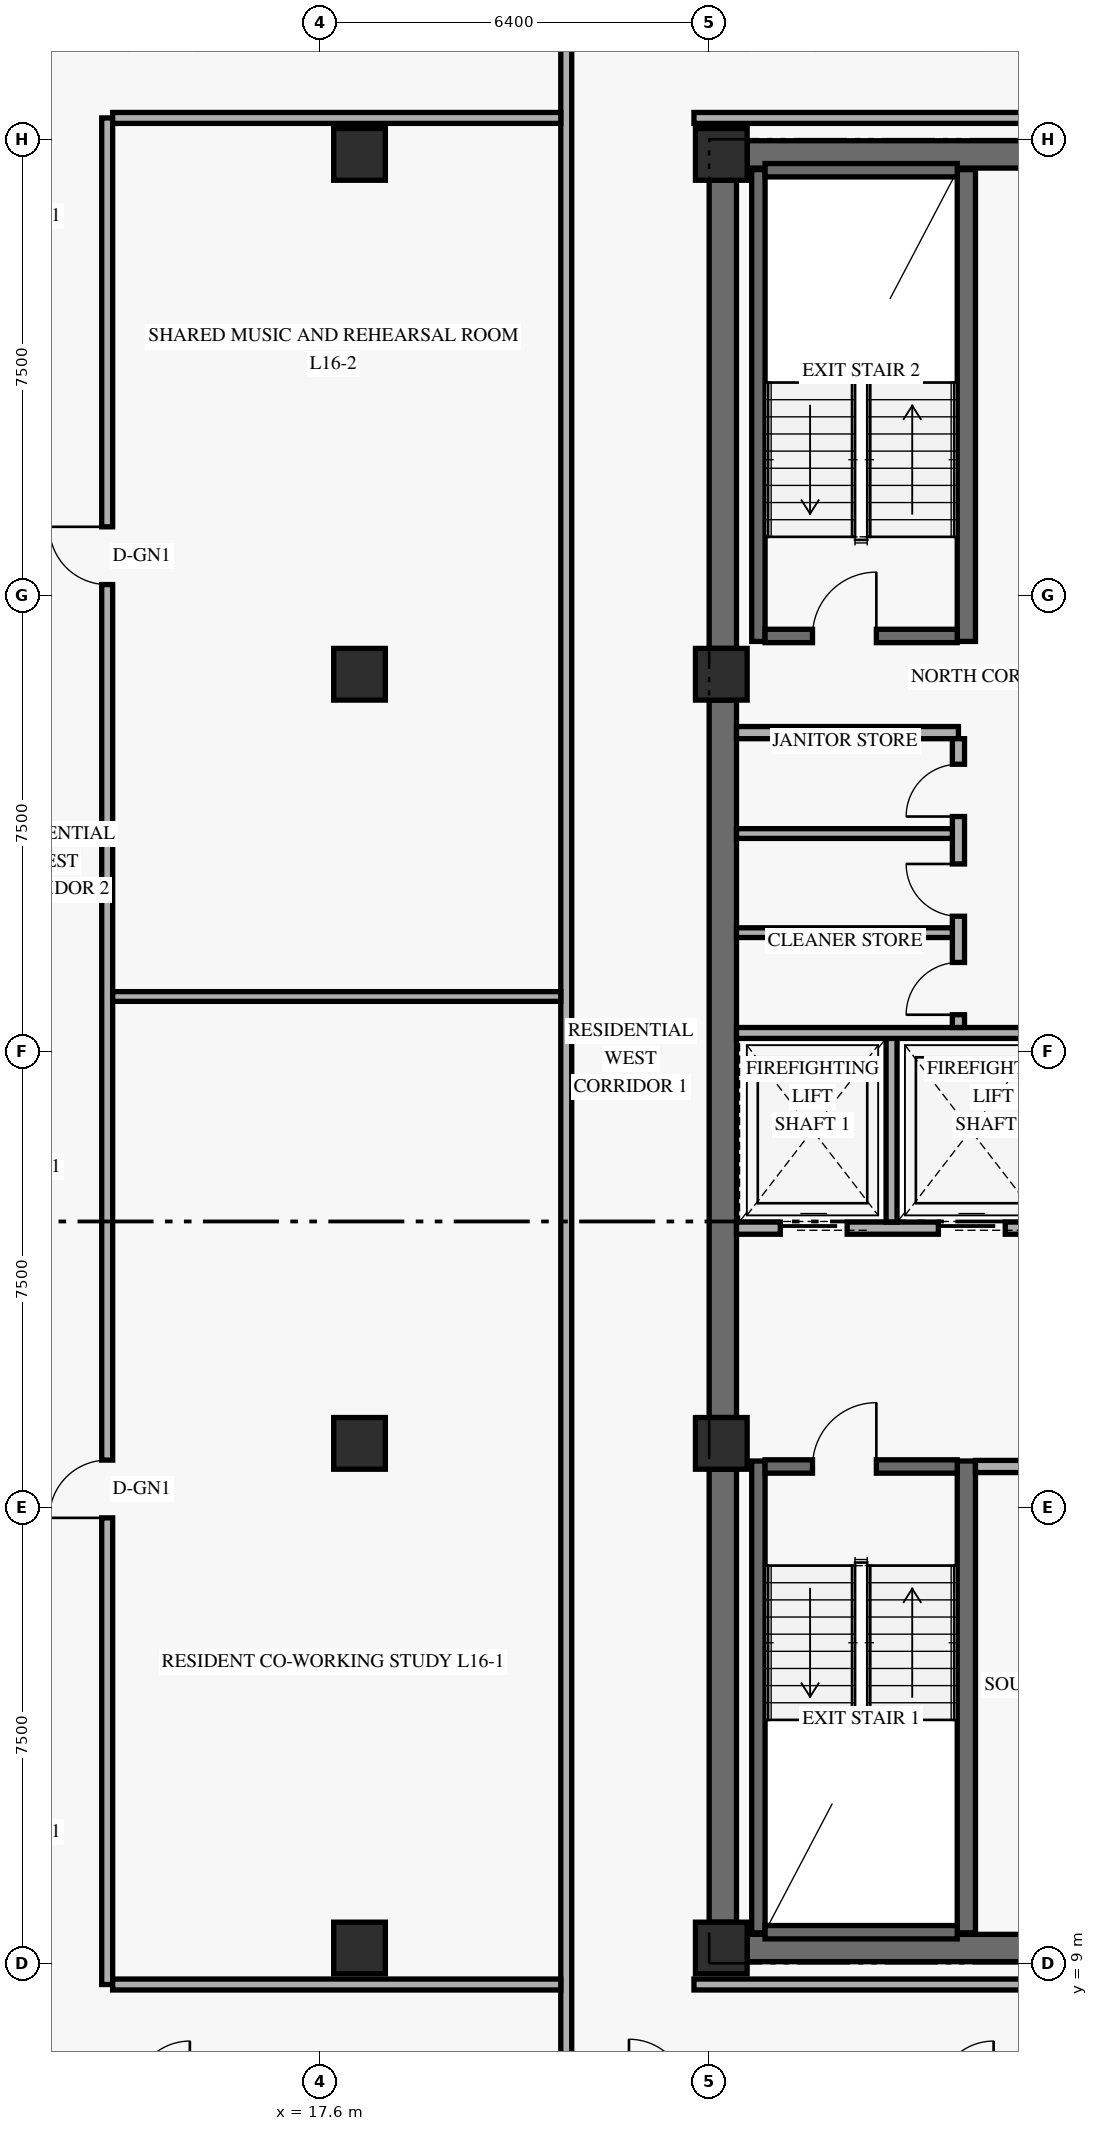
"""IFC4 building model, lengths in metres.
Left out: names, types, materials, properties, quantities, classifications, styles, units other than length and angle.
Written with IfcOpenShell. Run it as: python <this file> out.ifc"""

import sys

from ifc_helpers import new_model, si_unit, direction, frame, frame_2d, origin, origin_2d, place, context, subcontext, project, spatial, rectangle, extrude, element, fill, save


model = new_model("IFC4")
c1 = context("Model", 3, precision=1e-05, world=origin(), true_north=direction((0.0, 1.0)))
c2 = subcontext(c1, "Body", "Model", "MODEL_VIEW")
j1 = project(units=[si_unit("LENGTHUNIT", "METRE"), si_unit("PLANEANGLEUNIT", "RADIAN")], contexts=[c1])
p1 = place(None, origin())
s1 = spatial("IfcSite", under=j1, at=p1, CompositionType="ELEMENT")
p2 = place(p1, origin())
s2 = spatial("IfcBuilding", under=s1, at=p2, CompositionType="ELEMENT")
p3 = place(p2, frame((0.0, 0.0, 64.2)))
s3 = spatial("IfcBuildingStorey", under=s2, at=p3, CompositionType="ELEMENT", Elevation=64.2)
p4 = place(p3, frame((24.225, 9.675, 0.0), z_axis=(0.0, 0.0, 1.0), x_axis=(0.0, 1.0, 0.0)))
e1 = element("IfcWall", 1, at=p4, inside=s3, PredefinedType="SHEAR", context=c2, shape_type="SweptSolid", body=[
    extrude(rectangle(XDim=7.45, YDim=0.45, at=frame_2d((3.725, 0.0))), origin(), (0.0, 0.0, 1.0), 2.667),
])
p5 = place(p3, frame((24.225, 17.975, 0.0), z_axis=(0.0, 0.0, 1.0), x_axis=(0.0, 1.0, 0.0)))
e2 = element("IfcWall", 2, at=p5, inside=s3, PredefinedType="SHEAR", context=c2, shape_type="SweptSolid", body=[
    extrude(rectangle(XDim=11.8, YDim=0.45, at=frame_2d((5.9, 0.0))), origin(), (0.0, 0.0, 1.0), 2.667),
])
p6 = place(p3, frame((24.225, 30.625, 0.0), z_axis=(0.0, 0.0, 1.0), x_axis=(0.0, 1.0, 0.0)))
e3 = element("IfcWall", 3, at=p6, inside=s3, PredefinedType="SHEAR", context=c2, shape_type="SweptSolid", body=[
    extrude(rectangle(XDim=7.7, YDim=0.45, at=frame_2d((3.85, 0.0))), origin(), (0.0, 0.0, 1.0), 2.667),
])
for number, where, z_axis, x_axis in (
    (4, (24.625, 9.25, 0.0), (0.0, 0.0, 1.0), (1.0, 0.0, 0.0)),
    (5, (24.625, 38.75, 0.0), (0.0, 0.0, 1.0), (1.0, 0.0, 0.0)),
):
    element("IfcWall", number, at=place(p3, frame(where, z_axis=z_axis, x_axis=x_axis)), inside=s3, PredefinedType="SHEAR", context=c2, shape_type="SweptSolid", body=[
        extrude(rectangle(XDim=10.15, YDim=0.45, at=frame_2d((5.075, 0.0))), origin(), (0.0, 0.0, 1.0), 3.36),
    ])
p7 = place(p3, frame((24.81, 9.5, 0.0), z_axis=(0.0, 0.0, 1.0), x_axis=(0.0, 1.0, 0.0)))
e6 = element("IfcWall", 6, at=p7, inside=s3, PredefinedType="SHEAR", context=c2, shape_type="SweptSolid", body=[
    extrude(rectangle(XDim=7.76, YDim=0.22, at=frame_2d((3.88, 0.0))), origin(), (0.0, 0.0, 1.0), 3.36),
])
p8 = place(p3, frame((28.23, 9.5, 0.0), z_axis=(0.0, 0.0, 1.0), x_axis=(0.0, 1.0, 0.0)))
e7 = element("IfcWall", 7, at=p8, inside=s3, PredefinedType="SHEAR", context=c2, shape_type="SweptSolid", body=[
    extrude(rectangle(XDim=7.76, YDim=0.3, at=frame_2d((3.88, 0.0))), origin(), (0.0, 0.0, 1.0), 3.36),
])
p9 = place(p3, frame((24.92, 9.51, 0.0), z_axis=(0.0, 0.0, 1.0), x_axis=(1.0, 0.0, 0.0)))
e8 = element("IfcWall", 8, at=p9, inside=s3, PredefinedType="SHEAR", context=c2, shape_type="SweptSolid", body=[
    extrude(rectangle(XDim=3.16, YDim=0.22, at=frame_2d((1.58, 0.0))), origin(), (0.0, 0.0, 1.0), 3.36),
])
p10 = place(p3, frame((24.92, 17.17, 0.0), z_axis=(0.0, 0.0, 1.0), x_axis=(1.0, 0.0, 0.0)))
e9 = element("IfcWall", 9, at=p10, inside=s3, PredefinedType="SHEAR", context=c2, shape_type="SweptSolid", body=[
    extrude(rectangle(XDim=3.16, YDim=0.22, at=frame_2d((1.58, 0.0))), origin(), (0.0, 0.0, 1.0), 3.36),
])
p11 = place(p10, frame((0.78, 0.0, 0.0)))
e10 = element("IfcOpeningElement", 10, at=p11, cuts=e9, PredefinedType="OPENING", context=c2, shape_type="SweptSolid", body=[
    extrude(rectangle(XDim=1.05, YDim=2.15, at=frame_2d((0.525, 1.075))), frame((0.0, 0.12, 0.0), z_axis=(0.0, -1.0, 0.0), x_axis=(1.0, 0.0, 0.0)), (0.0, 0.0, 1.0), 0.24),
])
p12 = place(p3, frame((24.81, 30.74, 0.0), z_axis=(0.0, 0.0, 1.0), x_axis=(0.0, 1.0, 0.0)))
e11 = element("IfcWall", 11, at=p12, inside=s3, PredefinedType="SHEAR", context=c2, shape_type="SweptSolid", body=[
    extrude(rectangle(XDim=7.76, YDim=0.22, at=frame_2d((3.88, 0.0))), origin(), (0.0, 0.0, 1.0), 3.36),
])
p13 = place(p3, frame((28.23, 30.74, 0.0), z_axis=(0.0, 0.0, 1.0), x_axis=(0.0, 1.0, 0.0)))
e12 = element("IfcWall", 12, at=p13, inside=s3, PredefinedType="SHEAR", context=c2, shape_type="SweptSolid", body=[
    extrude(rectangle(XDim=7.76, YDim=0.3, at=frame_2d((3.88, 0.0))), origin(), (0.0, 0.0, 1.0), 3.36),
])
p14 = place(p3, frame((24.92, 30.83, 0.0), z_axis=(0.0, 0.0, 1.0), x_axis=(1.0, 0.0, 0.0)))
e13 = element("IfcWall", 13, at=p14, inside=s3, PredefinedType="SHEAR", context=c2, shape_type="SweptSolid", body=[
    extrude(rectangle(XDim=3.16, YDim=0.22, at=frame_2d((1.58, 0.0))), origin(), (0.0, 0.0, 1.0), 3.36),
])
p15 = place(p14, frame((0.78, 0.0, 0.0)))
e14 = element("IfcOpeningElement", 14, at=p15, cuts=e13, PredefinedType="OPENING", context=c2, shape_type="SweptSolid", body=[
    extrude(rectangle(XDim=1.05, YDim=2.15, at=frame_2d((0.525, 1.075))), frame((0.0, 0.12, 0.0), z_axis=(0.0, -1.0, 0.0), x_axis=(1.0, 0.0, 0.0)), (0.0, 0.0, 1.0), 0.24),
])
p16 = place(p3, frame((24.92, 38.49, 0.0), z_axis=(0.0, 0.0, 1.0), x_axis=(1.0, 0.0, 0.0)))
e15 = element("IfcWall", 15, at=p16, inside=s3, PredefinedType="SHEAR", context=c2, shape_type="SweptSolid", body=[
    extrude(rectangle(XDim=3.16, YDim=0.22, at=frame_2d((1.58, 0.0))), origin(), (0.0, 0.0, 1.0), 3.36),
])
for number, where, z_axis, x_axis in (
    (16, (18.25, 9.25, 0.0), (0.0, 0.0, 1.0), (1.0, 0.0, 0.0)),
    (17, (18.25, 17.55, 0.0), (0.0, 0.0, 1.0), (1.0, 0.0, 0.0)),
    (18, (18.25, 30.2, 0.0), (0.0, 0.0, 1.0), (1.0, 0.0, 0.0)),
    (19, (18.25, 38.75, 0.0), (0.0, 0.0, 1.0), (1.0, 0.0, 0.0)),
    (20, (24.2, 9.25, 0.0), (0.0, 0.0, 1.0), (1.0, 0.0, 0.0)),
    (21, (24.2, 17.55, 0.0), (0.0, 0.0, 1.0), (1.0, 0.0, 0.0)),
    (22, (24.2, 30.2, 0.0), (0.0, 0.0, 1.0), (1.0, 0.0, 0.0)),
    (23, (24.2, 38.75, 0.0), (0.0, 0.0, 1.0), (1.0, 0.0, 0.0)),
):
    element("IfcColumn", number, at=place(p3, frame(where, z_axis=z_axis, x_axis=x_axis)), inside=s3, PredefinedType="COLUMN", context=c2, shape_type="SweptSolid", body=[
        extrude(rectangle(XDim=0.85, YDim=0.85, at=origin_2d()), origin(), (0.0, 0.0, 1.0), 3.6),
    ])
p17 = place(p3, frame((24.45, 21.09, 0.0), z_axis=(0.0, 0.0, 1.0), x_axis=(1.0, 0.0, 0.0)))
e24 = element("IfcWall", 24, at=p17, inside=s3, PredefinedType="STANDARD", context=c2, shape_type="SweptSolid", body=[
    extrude(rectangle(XDim=6.83, YDim=0.2, at=frame_2d((3.415, 0.0))), origin(), (0.0, 0.0, 1.0), 3.36),
])
p18 = place(p17, frame((0.72, 0.0, 0.0)))
e25 = element("IfcOpeningElement", 25, at=p18, cuts=e24, PredefinedType="OPENING", context=c2, shape_type="SweptSolid", body=[
    extrude(rectangle(XDim=1.1, YDim=2.2, at=frame_2d((0.55, 1.1))), frame((0.0, 0.11, 0.0), z_axis=(0.0, -1.0, 0.0), x_axis=(1.0, 0.0, 0.0)), (0.0, 0.0, 1.0), 0.22),
])
p19 = place(p17, frame((3.32, 0.0, 0.0)))
e26 = element("IfcOpeningElement", 26, at=p19, cuts=e24, PredefinedType="OPENING", context=c2, shape_type="SweptSolid", body=[
    extrude(rectangle(XDim=1.1, YDim=2.2, at=frame_2d((0.55, 1.1))), frame((0.0, 0.11, 0.0), z_axis=(0.0, -1.0, 0.0), x_axis=(1.0, 0.0, 0.0)), (0.0, 0.0, 1.0), 0.22),
])
p20 = place(p3, frame((28.38, 17.17, 0.0), z_axis=(0.0, 0.0, 1.0), x_axis=(1.0, 0.0, 0.0)))
e27 = element("IfcWall", 27, at=p20, inside=s3, PredefinedType="STANDARD", context=c2, shape_type="SweptSolid", body=[
    extrude(rectangle(XDim=2.9, YDim=0.2, at=frame_2d((1.45, 0.0))), origin(), (0.0, 0.0, 1.0), 3.36),
])
p21 = place(p3, frame((27.0, 21.19, 0.0), z_axis=(0.0, 0.0, 1.0), x_axis=(0.0, 1.0, 0.0)))
e28 = element("IfcWall", 28, at=p21, inside=s3, PredefinedType="STANDARD", context=c2, shape_type="SweptSolid", body=[
    extrude(rectangle(XDim=3.11, YDim=0.18, at=frame_2d((1.555, 0.0))), origin(), (0.0, 0.0, 1.0), 3.36),
])
p22 = place(p3, frame((24.45, 24.3, 0.0), z_axis=(0.0, 0.0, 1.0), x_axis=(1.0, 0.0, 0.0)))
e29 = element("IfcWall", 29, at=p22, inside=s3, PredefinedType="STANDARD", context=c2, shape_type="SweptSolid", body=[
    extrude(rectangle(XDim=6.83, YDim=0.18, at=frame_2d((3.415, 0.0))), origin(), (0.0, 0.0, 1.0), 3.36),
])
p23 = place(p3, frame((24.45, 29.24, 0.0), z_axis=(0.0, 0.0, 1.0), x_axis=(1.0, 0.0, 0.0)))
e30 = element("IfcWall", 30, at=p23, inside=s3, PredefinedType="STANDARD", context=c2, shape_type="SweptSolid", body=[
    extrude(rectangle(XDim=3.65, YDim=0.2, at=frame_2d((1.825, 0.0))), origin(), (0.0, 0.0, 1.0), 3.36),
])
p24 = place(p3, frame((28.1, 24.39, 0.0), z_axis=(0.0, 0.0, 1.0), x_axis=(0.0, 1.0, 0.0)))
e31 = element("IfcWall", 31, at=p24, inside=s3, PredefinedType="STANDARD", context=c2, shape_type="SweptSolid", body=[
    extrude(rectangle(XDim=4.75, YDim=0.2, at=frame_2d((2.375, 0.0))), origin(), (0.0, 0.0, 1.0), 3.36),
])
p25 = place(p24, frame((0.21, 0.0, 0.0)))
e32 = element("IfcOpeningElement", 32, at=p25, cuts=e31, PredefinedType="OPENING", context=c2, shape_type="SweptSolid", body=[
    extrude(rectangle(XDim=0.86, YDim=2.1, at=frame_2d((0.43, 1.05))), frame((0.0, 0.11, 0.0), z_axis=(0.0, -1.0, 0.0), x_axis=(1.0, 0.0, 0.0)), (0.0, 0.0, 1.0), 0.22),
])
p26 = place(p24, frame((1.83, 0.0, 0.0)))
e33 = element("IfcOpeningElement", 33, at=p26, cuts=e31, PredefinedType="OPENING", context=c2, shape_type="SweptSolid", body=[
    extrude(rectangle(XDim=0.86, YDim=2.1, at=frame_2d((0.43, 1.05))), frame((0.0, 0.11, 0.0), z_axis=(0.0, -1.0, 0.0), x_axis=(1.0, 0.0, 0.0)), (0.0, 0.0, 1.0), 0.22),
])
p27 = place(p24, frame((3.47, 0.0, 0.0)))
e34 = element("IfcOpeningElement", 34, at=p27, cuts=e31, PredefinedType="OPENING", context=c2, shape_type="SweptSolid", body=[
    extrude(rectangle(XDim=0.86, YDim=2.1, at=frame_2d((0.43, 1.05))), frame((0.0, 0.11, 0.0), z_axis=(0.0, -1.0, 0.0), x_axis=(1.0, 0.0, 0.0)), (0.0, 0.0, 1.0), 0.22),
])
for number, where, z_axis, x_axis in (
    (35, (24.45, 25.95, 0.0), (0.0, 0.0, 1.0), (1.0, 0.0, 0.0)),
    (36, (24.45, 27.58, 0.0), (0.0, 0.0, 1.0), (1.0, 0.0, 0.0)),
):
    element("IfcWall", number, at=place(p3, frame(where, z_axis=z_axis, x_axis=x_axis)), inside=s3, PredefinedType="PARTITIONING", context=c2, shape_type="SweptSolid", body=[
        extrude(rectangle(XDim=3.55, YDim=0.16, at=frame_2d((1.775, 0.0))), origin(), (0.0, 0.0, 1.0), 3.36),
    ])
p28 = place(p3, frame((21.65, 6.8, 0.0), z_axis=(0.0, 0.0, 1.0), x_axis=(0.0, 1.0, 0.0)))
e37 = element("IfcWall", 37, at=p28, inside=s3, PredefinedType="STANDARD", context=c2, shape_type="SweptSolid", body=[
    extrude(rectangle(XDim=34.4, YDim=0.18, at=frame_2d((17.2, 0.0))), origin(), (0.0, 0.0, 1.0), 2.649),
])
for number, where, z_axis, x_axis in (
    (38, (23.75, 8.65, 0.0), (0.0, 0.0, 1.0), (1.0, 0.0, 0.0)),
    (39, (23.75, 39.35, 0.0), (0.0, 0.0, 1.0), (1.0, 0.0, 0.0)),
):
    element("IfcWall", number, at=place(p3, frame(where, z_axis=z_axis, x_axis=x_axis)), inside=s3, PredefinedType="STANDARD", context=c2, shape_type="SweptSolid", body=[
        extrude(rectangle(XDim=11.67, YDim=0.18, at=frame_2d((5.835, 0.0))), origin(), (0.0, 0.0, 1.0), 2.649),
    ])
p29 = place(p3, frame((14.1, 8.65, 0.0), z_axis=(0.0, 0.0, 1.0), x_axis=(0.0, 1.0, 0.0)))
e40 = element("IfcWall", 40, at=p29, inside=s3, PredefinedType="STANDARD", context=c2, shape_type="SweptSolid", body=[
    extrude(rectangle(XDim=30.7, YDim=0.18, at=frame_2d((15.35, 0.0))), origin(), (0.0, 0.0, 1.0), 2.649),
])
p30 = place(p29, frame((7.675, 0.0, 0.0)))
e41 = element("IfcOpeningElement", 41, at=p30, cuts=e40, PredefinedType="OPENING", context=c2, shape_type="SweptSolid", body=[
    extrude(rectangle(XDim=0.95, YDim=2.15, at=frame_2d((0.475, 1.075))), frame((0.0, 0.1, 0.0), z_axis=(0.0, -1.0, 0.0), x_axis=(1.0, 0.0, 0.0)), (0.0, 0.0, 1.0), 0.2),
])
p31 = place(p29, frame((23.025, 0.0, 0.0)))
e42 = element("IfcOpeningElement", 42, at=p31, cuts=e40, PredefinedType="OPENING", context=c2, shape_type="SweptSolid", body=[
    extrude(rectangle(XDim=0.95, YDim=2.15, at=frame_2d((0.475, 1.075))), frame((0.0, 0.1, 0.0), z_axis=(0.0, -1.0, 0.0), x_axis=(1.0, 0.0, 0.0)), (0.0, 0.0, 1.0), 0.2),
])
for number, where, z_axis, x_axis in (
    (43, (14.19, 8.65, 0.0), (0.0, 0.0, 1.0), (1.0, 0.0, 0.0)),
    (44, (14.19, 39.35, 0.0), (0.0, 0.0, 1.0), (1.0, 0.0, 0.0)),
):
    element("IfcWall", number, at=place(p3, frame(where, z_axis=z_axis, x_axis=x_axis)), inside=s3, PredefinedType="STANDARD", context=c2, shape_type="SweptSolid", body=[
        extrude(rectangle(XDim=7.37, YDim=0.18, at=frame_2d((3.685, 0.0))), origin(), (0.0, 0.0, 1.0), 2.649),
    ])
p32 = place(p3, frame((14.19, 24.9, 0.0), z_axis=(0.0, 0.0, 1.0), x_axis=(1.0, 0.0, 0.0)))
e45 = element("IfcWall", 45, at=p32, inside=s3, PredefinedType="PARTITIONING", context=c2, shape_type="SweptSolid", body=[
    extrude(rectangle(XDim=7.37, YDim=0.16, at=frame_2d((3.685, 0.0))), origin(), (0.0, 0.0, 1.0), 2.649),
])
p33 = place(p11, frame((1.05, 0.0, 0.0), z_axis=(0.0, 0.0, 1.0), x_axis=(-1.0, 0.0, 0.0)))
e46 = element("IfcDoor", 46, at=p33, inside=s3, OperationType="SINGLE_SWING_LEFT", PredefinedType="DOOR", context=c2, shape_type="SweptSolid", body=[
    extrude(rectangle(XDim=1.05, YDim=2.15, at=frame_2d((0.525, 1.075))), frame((0.0, 0.025, 0.0), z_axis=(0.0, -1.0, 0.0), x_axis=(1.0, 0.0, 0.0)), (0.0, 0.0, 1.0), 0.05),
])
fill(e10, e46)
p34 = place(p15, origin())
e47 = element("IfcDoor", 47, at=p34, inside=s3, OperationType="SINGLE_SWING_RIGHT", PredefinedType="DOOR", context=c2, shape_type="SweptSolid", body=[
    extrude(rectangle(XDim=1.05, YDim=2.15, at=frame_2d((0.525, 1.075))), frame((0.0, 0.025, 0.0), z_axis=(0.0, -1.0, 0.0), x_axis=(1.0, 0.0, 0.0)), (0.0, 0.0, 1.0), 0.05),
])
fill(e14, e47)
p35 = place(p18, origin())
e48 = element("IfcDoor", 48, at=p35, inside=s3, OperationType="SLIDING_TO_LEFT", PredefinedType="DOOR", context=c2, shape_type="SweptSolid", body=[
    extrude(rectangle(XDim=1.1, YDim=2.2, at=frame_2d((0.55, 1.1))), frame((0.0, 0.025, 0.0), z_axis=(0.0, -1.0, 0.0), x_axis=(1.0, 0.0, 0.0)), (0.0, 0.0, 1.0), 0.05),
])
fill(e25, e48)
p36 = place(p19, origin())
e49 = element("IfcDoor", 49, at=p36, inside=s3, OperationType="SLIDING_TO_LEFT", PredefinedType="DOOR", context=c2, shape_type="SweptSolid", body=[
    extrude(rectangle(XDim=1.1, YDim=2.2, at=frame_2d((0.55, 1.1))), frame((0.0, 0.025, 0.0), z_axis=(0.0, -1.0, 0.0), x_axis=(1.0, 0.0, 0.0)), (0.0, 0.0, 1.0), 0.05),
])
fill(e26, e49)
p37 = place(p25, origin())
e50 = element("IfcDoor", 50, at=p37, inside=s3, OperationType="SINGLE_SWING_LEFT", PredefinedType="DOOR", context=c2, shape_type="SweptSolid", body=[
    extrude(rectangle(XDim=0.86, YDim=2.1, at=frame_2d((0.43, 1.05))), frame((0.0, 0.025, 0.0), z_axis=(0.0, -1.0, 0.0), x_axis=(1.0, 0.0, 0.0)), (0.0, 0.0, 1.0), 0.05),
])
fill(e32, e50)
p38 = place(p26, origin())
e51 = element("IfcDoor", 51, at=p38, inside=s3, OperationType="SINGLE_SWING_RIGHT", PredefinedType="DOOR", context=c2, shape_type="SweptSolid", body=[
    extrude(rectangle(XDim=0.86, YDim=2.1, at=frame_2d((0.43, 1.05))), frame((0.0, 0.025, 0.0), z_axis=(0.0, -1.0, 0.0), x_axis=(1.0, 0.0, 0.0)), (0.0, 0.0, 1.0), 0.05),
])
fill(e33, e51)
p39 = place(p27, origin())
e52 = element("IfcDoor", 52, at=p39, inside=s3, OperationType="SINGLE_SWING_LEFT", PredefinedType="DOOR", context=c2, shape_type="SweptSolid", body=[
    extrude(rectangle(XDim=0.86, YDim=2.1, at=frame_2d((0.43, 1.05))), frame((0.0, 0.025, 0.0), z_axis=(0.0, -1.0, 0.0), x_axis=(1.0, 0.0, 0.0)), (0.0, 0.0, 1.0), 0.05),
])
fill(e34, e52)
p40 = place(p30, origin())
e53 = element("IfcDoor", 53, at=p40, inside=s3, OperationType="SINGLE_SWING_LEFT", PredefinedType="DOOR", context=c2, shape_type="SweptSolid", body=[
    extrude(rectangle(XDim=0.95, YDim=2.15, at=frame_2d((0.475, 1.075))), frame((0.0, 0.025, 0.0), z_axis=(0.0, -1.0, 0.0), x_axis=(1.0, 0.0, 0.0)), (0.0, 0.0, 1.0), 0.05),
])
fill(e41, e53)
p41 = place(p31, origin())
e54 = element("IfcDoor", 54, at=p41, inside=s3, OperationType="SINGLE_SWING_RIGHT", PredefinedType="DOOR", context=c2, shape_type="SweptSolid", body=[
    extrude(rectangle(XDim=0.95, YDim=2.15, at=frame_2d((0.475, 1.075))), frame((0.0, 0.025, 0.0), z_axis=(0.0, -1.0, 0.0), x_axis=(1.0, 0.0, 0.0)), (0.0, 0.0, 1.0), 0.05),
])
fill(e42, e54)
save(model, sys.argv[1])
